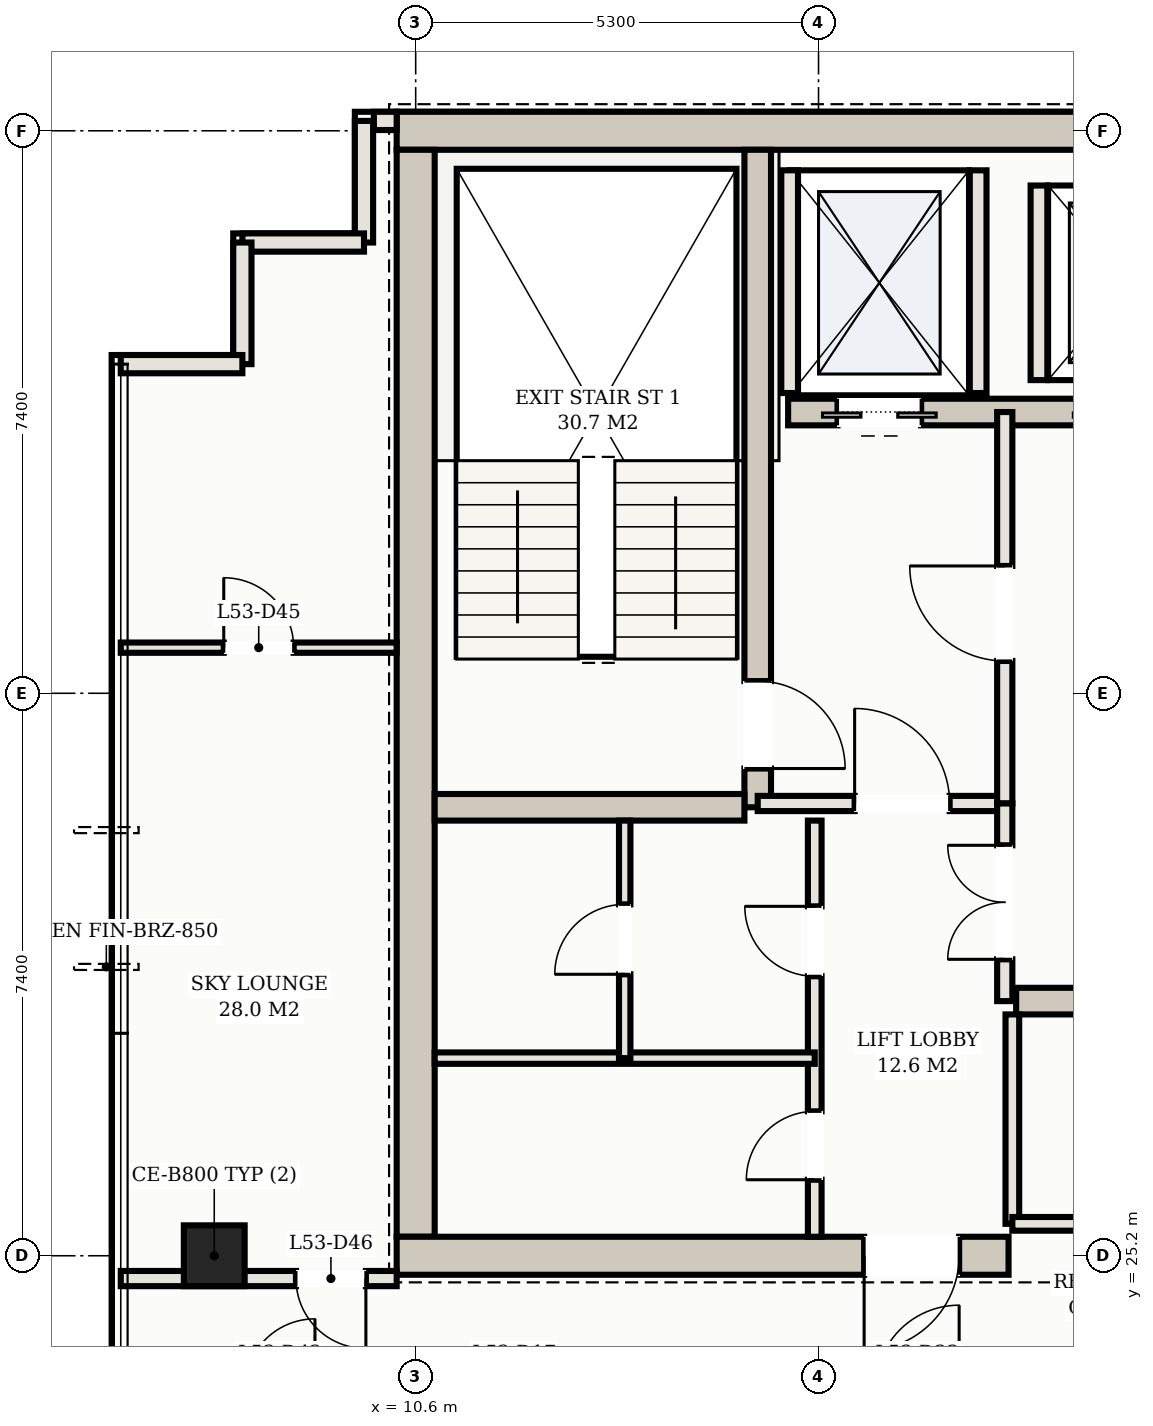
"""IFC4 building model, lengths in metres.
Left out: names, types, materials, properties, quantities, classifications, styles, units other than length and angle.
Written with IfcOpenShell. Run it as: python <this file> out.ifc"""

import sys

from ifc_helpers import new_model, si_unit, direction, frame, frame_2d, origin, origin_2d, place, context, subcontext, project, spatial, rectangle, hollow_rectangle, extrude, element, fill, save


model = new_model("IFC4")
c1 = context("Model", 3, precision=1e-05, world=origin(), true_north=direction((0.0, 1.0)))
c2 = subcontext(c1, "Body", "Model", "MODEL_VIEW")
j1 = project(units=[si_unit("LENGTHUNIT", "METRE"), si_unit("PLANEANGLEUNIT", "RADIAN")], contexts=[c1])
p1 = place(None, origin())
s1 = spatial("IfcSite", under=j1, at=p1, CompositionType="ELEMENT")
p2 = place(p1, origin())
s2 = spatial("IfcBuilding", under=s1, at=p2, CompositionType="ELEMENT")
p3 = place(p2, frame((0.0, 0.0, 196.7)))
s3 = spatial("IfcBuildingStorey", under=s2, at=p3, CompositionType="ELEMENT", Elevation=196.7)
p4 = place(p3, frame((10.35, 40.0, 0.0), z_axis=(0.0, 0.0, 1.0), x_axis=(1.0, 0.0, 0.0)))
e1 = element("IfcWall", 1, at=p4, inside=s3, PredefinedType="SHEAR", context=c2, shape_type="SweptSolid", body=[
    extrude(rectangle(XDim=32.3, YDim=0.5, at=frame_2d((16.15, 0.0))), origin(), (0.0, 0.0, 1.0), 3.11),
])
p5 = place(p3, frame((10.6, 25.45, 0.0), z_axis=(0.0, 0.0, 1.0), x_axis=(0.0, 1.0, 0.0)))
e2 = element("IfcWall", 2, at=p5, inside=s3, PredefinedType="SHEAR", context=c2, shape_type="SweptSolid", body=[
    extrude(rectangle(XDim=14.3, YDim=0.5, at=frame_2d((7.15, 0.0))), origin(), (0.0, 0.0, 1.0), 3.11),
])
p6 = place(p3, frame((10.35, 25.2, 0.0), z_axis=(0.0, 0.0, 1.0), x_axis=(1.0, 0.0, 0.0)))
e3 = element("IfcWall", 3, at=p6, inside=s3, PredefinedType="SHEAR", context=c2, shape_type="SweptSolid", body=[
    extrude(rectangle(XDim=8.05, YDim=0.5, at=frame_2d((4.025, 0.0))), origin(), (0.0, 0.0, 1.0), 3.11),
])
p7 = place(p6, frame((6.15, 0.0, 0.0)))
e4 = element("IfcOpeningElement", 4, at=p7, cuts=e3, PredefinedType="OPENING", context=c2, shape_type="SweptSolid", body=[
    extrude(rectangle(XDim=1.25, YDim=2.2, at=frame_2d((0.625, 1.1))), frame((0.0, 0.26, 0.0), z_axis=(0.0, -1.0, 0.0), x_axis=(1.0, 0.0, 0.0)), (0.0, 0.0, 1.0), 0.52),
])
p8 = place(p3, frame((15.1, 31.1, 0.0), z_axis=(0.0, 0.0, 1.0), x_axis=(0.0, 1.0, 0.0)))
e5 = element("IfcWall", 5, at=p8, inside=s3, PredefinedType="SHEAR", context=c2, shape_type="SweptSolid", body=[
    extrude(rectangle(XDim=8.65, YDim=0.35, at=frame_2d((4.325, 0.0))), origin(), (0.0, 0.0, 1.0), 3.11),
])
p9 = place(p8, frame((0.51, 0.0, 0.0)))
e6 = element("IfcOpeningElement", 6, at=p9, cuts=e5, PredefinedType="OPENING", context=c2, shape_type="SweptSolid", body=[
    extrude(rectangle(XDim=1.15, YDim=2.2, at=frame_2d((0.575, 1.1))), frame((0.0, 0.185, 0.0), z_axis=(0.0, -1.0, 0.0), x_axis=(1.0, 0.0, 0.0)), (0.0, 0.0, 1.0), 0.37),
])
p10 = place(p3, frame((10.85, 31.1, 0.0), z_axis=(0.0, 0.0, 1.0), x_axis=(1.0, 0.0, 0.0)))
e7 = element("IfcWall", 7, at=p10, inside=s3, PredefinedType="SHEAR", context=c2, shape_type="SweptSolid", body=[
    extrude(rectangle(XDim=4.075, YDim=0.35, at=frame_2d((2.038, 0.0))), origin(), (0.0, 0.0, 1.0), 3.11),
])
p11 = place(p3, frame((15.5, 36.3, 0.0), z_axis=(0.0, 0.0, 1.0), x_axis=(1.0, 0.0, 0.0)))
e8 = element("IfcWall", 8, at=p11, inside=s3, PredefinedType="SHEAR", context=c2, shape_type="SweptSolid", body=[
    extrude(rectangle(XDim=22.0, YDim=0.35, at=frame_2d((11.0, 0.0))), origin(), (0.0, 0.0, 1.0), 3.11),
])
p12 = place(p11, frame((0.65, 0.0, 0.0)))
e9 = element("IfcOpeningElement", 9, at=p12, cuts=e8, PredefinedType="OPENING", context=c2, shape_type="SweptSolid", body=[
    extrude(rectangle(XDim=1.1, YDim=2.15, at=frame_2d((0.55, 1.075))), frame((0.0, 0.185, 0.0), z_axis=(0.0, -1.0, 0.0), x_axis=(1.0, 0.0, 0.0)), (0.0, 0.0, 1.0), 0.37),
])
p13 = place(p11, frame((20.25, 0.0, 0.0)))
e10 = element("IfcOpeningElement", 10, at=p13, cuts=e8, PredefinedType="OPENING", context=c2, shape_type="SweptSolid", body=[
    extrude(rectangle(XDim=1.1, YDim=2.15, at=frame_2d((0.55, 1.075))), frame((0.0, 0.185, 0.0), z_axis=(0.0, -1.0, 0.0), x_axis=(1.0, 0.0, 0.0)), (0.0, 0.0, 1.0), 0.37),
])
p14 = place(p11, frame((17.05, 0.0, 0.0)))
e11 = element("IfcOpeningElement", 11, at=p14, cuts=e8, PredefinedType="OPENING", context=c2, shape_type="SweptSolid", body=[
    extrude(rectangle(XDim=1.3, YDim=2.2, at=frame_2d((0.65, 1.1))), frame((0.0, 0.185, 0.0), z_axis=(0.0, -1.0, 0.0), x_axis=(1.0, 0.0, 0.0)), (0.0, 0.0, 1.0), 0.37),
])
p15 = place(p11, frame((3.95, 0.0, 0.0)))
e12 = element("IfcOpeningElement", 12, at=p15, cuts=e8, PredefinedType="OPENING", context=c2, shape_type="SweptSolid", body=[
    extrude(rectangle(XDim=1.1, YDim=2.15, at=frame_2d((0.55, 1.075))), frame((0.0, 0.185, 0.0), z_axis=(0.0, -1.0, 0.0), x_axis=(1.0, 0.0, 0.0)), (0.0, 0.0, 1.0), 0.37),
])
p16 = place(p11, frame((6.55, 0.0, 0.0)))
e13 = element("IfcOpeningElement", 13, at=p16, cuts=e8, PredefinedType="OPENING", context=c2, shape_type="SweptSolid", body=[
    extrude(rectangle(XDim=1.1, YDim=2.15, at=frame_2d((0.55, 1.075))), frame((0.0, 0.185, 0.0), z_axis=(0.0, -1.0, 0.0), x_axis=(1.0, 0.0, 0.0)), (0.0, 0.0, 1.0), 0.37),
])
p17 = place(p11, frame((9.15, 0.0, 0.0)))
e14 = element("IfcOpeningElement", 14, at=p17, cuts=e8, PredefinedType="OPENING", context=c2, shape_type="SweptSolid", body=[
    extrude(rectangle(XDim=1.1, YDim=2.15, at=frame_2d((0.55, 1.075))), frame((0.0, 0.185, 0.0), z_axis=(0.0, -1.0, 0.0), x_axis=(1.0, 0.0, 0.0)), (0.0, 0.0, 1.0), 0.37),
])
p18 = place(p3, frame((18.5, 28.55, 0.0), z_axis=(0.0, 0.0, 1.0), x_axis=(1.0, 0.0, 0.0)))
e15 = element("IfcWall", 15, at=p18, inside=s3, PredefinedType="SHEAR", context=c2, shape_type="SweptSolid", body=[
    extrude(rectangle(XDim=16.0, YDim=0.35, at=frame_2d((8.0, 0.0))), origin(), (0.0, 0.0, 1.0), 3.11),
])
p19 = place(p3, frame((7.95, 25.2, 0.0), z_axis=(0.0, 0.0, 1.0), x_axis=(1.0, 0.0, 0.0)))
e16 = element("IfcColumn", 16, at=p19, inside=s3, PredefinedType="COLUMN", context=c2, shape_type="SweptSolid", body=[
    extrude(hollow_rectangle(XDim=0.8, YDim=0.8, WallThickness=0.028, at=origin_2d()), origin(), (0.0, 0.0, 1.0), 3.3),
])
for number, where, z_axis, x_axis in (
    (17, (15.52, 36.55, 0.0), (0.0, 0.0, 1.0), (0.0, 1.0, 0.0)),
    (18, (18.0, 36.55, 0.0), (0.0, 0.0, 1.0), (0.0, 1.0, 0.0)),
):
    element("IfcWall", number, at=place(p3, frame(where, z_axis=z_axis, x_axis=x_axis)), inside=s3, PredefinedType="SOLIDWALL", context=c2, shape_type="SweptSolid", body=[
        extrude(rectangle(XDim=2.93, YDim=0.22, at=frame_2d((1.465, 0.0))), origin(), (0.0, 0.0, 1.0), 3.11),
    ])
p20 = place(p3, frame((18.8, 36.72, 0.0), z_axis=(0.0, 0.0, 1.0), x_axis=(0.0, 1.0, 0.0)))
e19 = element("IfcWall", 19, at=p20, inside=s3, PredefinedType="SOLIDWALL", context=c2, shape_type="SweptSolid", body=[
    extrude(rectangle(XDim=2.56, YDim=0.22, at=frame_2d((1.28, 0.0))), origin(), (0.0, 0.0, 1.0), 3.11),
])
p21 = place(p3, frame((10.35, 40.13, 0.0), z_axis=(0.0, 0.0, 1.0), x_axis=(-1.0, 0.0, 0.0)))
e20 = element("IfcWall", 20, at=p21, inside=s3, PredefinedType="SOLIDWALL", context=c2, shape_type="SweptSolid", body=[
    extrude(rectangle(XDim=0.3, YDim=0.24, at=frame_2d((0.15, 0.0))), origin(), (0.0, 0.0, 1.0), 3.11),
])
for number, where, z_axis, x_axis in (
    (21, (9.92, 40.13, 0.0), (0.0, 0.0, 1.0), (0.0, -1.0, 0.0)),
    (22, (9.92, 38.53, 0.0), (0.0, 0.0, 1.0), (-1.0, 0.0, 0.0)),
):
    element("IfcWall", number, at=place(p3, frame(where, z_axis=z_axis, x_axis=x_axis)), inside=s3, PredefinedType="SOLIDWALL", context=c2, shape_type="SweptSolid", body=[
        extrude(rectangle(XDim=1.6, YDim=0.24, at=frame_2d((0.8, 0.0))), origin(), (0.0, 0.0, 1.0), 3.11),
    ])
for number, where, z_axis, x_axis in (
    (23, (8.32, 38.53, 0.0), (0.0, 0.0, 1.0), (0.0, -1.0, 0.0)),
    (24, (8.32, 36.93, 0.0), (0.0, 0.0, 1.0), (-1.0, 0.0, 0.0)),
):
    element("IfcWall", number, at=place(p3, frame(where, z_axis=z_axis, x_axis=x_axis)), inside=s3, PredefinedType="SOLIDWALL", context=c2, shape_type="SweptSolid", body=[
        extrude(rectangle(XDim=1.6, YDim=0.24, at=frame_2d((0.8, 0.0))), origin(), (0.0, 0.0, 1.0), 3.11),
    ])
p22 = place(p3, frame((15.1, 31.15, 0.0), z_axis=(0.0, 0.0, 1.0), x_axis=(1.0, 0.0, 0.0)))
e25 = element("IfcWall", 25, at=p22, inside=s3, PredefinedType="PARTITIONING", context=c2, shape_type="SweptSolid", body=[
    extrude(rectangle(XDim=3.25, YDim=0.2, at=frame_2d((1.625, 0.0))), origin(), (0.0, 0.0, 1.0), 2.43),
])
p23 = place(p22, frame((1.275, 0.0, 0.0)))
e26 = element("IfcOpeningElement", 26, at=p23, cuts=e25, PredefinedType="OPENING", context=c2, shape_type="SweptSolid", body=[
    extrude(rectangle(XDim=1.25, YDim=2.2, at=frame_2d((0.625, 1.1))), frame((0.0, 0.11, 0.0), z_axis=(0.0, -1.0, 0.0), x_axis=(1.0, 0.0, 0.0)), (0.0, 0.0, 1.0), 0.22),
])
p24 = place(p3, frame((18.35, 31.15, 0.0), z_axis=(0.0, 0.0, 1.0), x_axis=(0.0, 1.0, 0.0)))
e27 = element("IfcWall", 27, at=p24, inside=s3, PredefinedType="PARTITIONING", context=c2, shape_type="SweptSolid", body=[
    extrude(rectangle(XDim=5.15, YDim=0.2, at=frame_2d((2.575, 0.0))), origin(), (0.0, 0.0, 1.0), 2.43),
])
p25 = place(p24, frame((1.875, 0.0, 0.0)))
e28 = element("IfcOpeningElement", 28, at=p25, cuts=e27, PredefinedType="OPENING", context=c2, shape_type="SweptSolid", body=[
    extrude(rectangle(XDim=1.25, YDim=2.2, at=frame_2d((0.625, 1.1))), frame((0.0, 0.11, 0.0), z_axis=(0.0, -1.0, 0.0), x_axis=(1.0, 0.0, 0.0)), (0.0, 0.0, 1.0), 0.22),
])
p26 = place(p3, frame((15.85, 25.45, 0.0), z_axis=(0.0, 0.0, 1.0), x_axis=(0.0, 1.0, 0.0)))
e29 = element("IfcWall", 29, at=p26, inside=s3, PredefinedType="PARTITIONING", context=c2, shape_type="SweptSolid", body=[
    extrude(rectangle(XDim=5.475, YDim=0.18, at=frame_2d((2.738, 0.0))), origin(), (0.0, 0.0, 1.0), 2.43),
])
p27 = place(p26, frame((0.75, 0.0, 0.0)))
e30 = element("IfcOpeningElement", 30, at=p27, cuts=e29, PredefinedType="OPENING", context=c2, shape_type="SweptSolid", body=[
    extrude(rectangle(XDim=0.9, YDim=2.15, at=frame_2d((0.45, 1.075))), frame((0.0, 0.1, 0.0), z_axis=(0.0, -1.0, 0.0), x_axis=(1.0, 0.0, 0.0)), (0.0, 0.0, 1.0), 0.2),
])
p28 = place(p26, frame((3.427, 0.0, 0.0)))
e31 = element("IfcOpeningElement", 31, at=p28, cuts=e29, PredefinedType="OPENING", context=c2, shape_type="SweptSolid", body=[
    extrude(rectangle(XDim=0.92, YDim=2.15, at=frame_2d((0.46, 1.075))), frame((0.0, 0.1, 0.0), z_axis=(0.0, -1.0, 0.0), x_axis=(1.0, 0.0, 0.0)), (0.0, 0.0, 1.0), 0.2),
])
p29 = place(p3, frame((10.85, 27.8, 0.0), z_axis=(0.0, 0.0, 1.0), x_axis=(1.0, 0.0, 0.0)))
e32 = element("IfcWall", 32, at=p29, inside=s3, PredefinedType="PARTITIONING", context=c2, shape_type="SweptSolid", body=[
    extrude(rectangle(XDim=5.0, YDim=0.15, at=frame_2d((2.5, 0.0))), origin(), (0.0, 0.0, 1.0), 2.43),
])
p30 = place(p3, frame((13.35, 27.8, 0.0), z_axis=(0.0, 0.0, 1.0), x_axis=(0.0, 1.0, 0.0)))
e33 = element("IfcWall", 33, at=p30, inside=s3, PredefinedType="PARTITIONING", context=c2, shape_type="SweptSolid", body=[
    extrude(rectangle(XDim=3.125, YDim=0.15, at=frame_2d((1.562, 0.0))), origin(), (0.0, 0.0, 1.0), 2.43),
])
p31 = place(p30, frame((1.103, 0.0, 0.0)))
e34 = element("IfcOpeningElement", 34, at=p31, cuts=e33, PredefinedType="OPENING", context=c2, shape_type="SweptSolid", body=[
    extrude(rectangle(XDim=0.92, YDim=2.15, at=frame_2d((0.46, 1.075))), frame((0.0, 0.085, 0.0), z_axis=(0.0, -1.0, 0.0), x_axis=(1.0, 0.0, 0.0)), (0.0, 0.0, 1.0), 0.17),
])
p32 = place(p3, frame((18.35, 28.55, 0.0), z_axis=(0.0, 0.0, 1.0), x_axis=(0.0, 1.0, 0.0)))
e35 = element("IfcWall", 35, at=p32, inside=s3, PredefinedType="PARTITIONING", context=c2, shape_type="SweptSolid", body=[
    extrude(rectangle(XDim=2.6, YDim=0.2, at=frame_2d((1.3, 0.0))), origin(), (0.0, 0.0, 1.0), 2.43),
])
p33 = place(p32, frame((0.55, 0.0, 0.0)))
e36 = element("IfcOpeningElement", 36, at=p33, cuts=e35, PredefinedType="OPENING", context=c2, shape_type="SweptSolid", body=[
    extrude(rectangle(XDim=1.5, YDim=2.25, at=frame_2d((0.75, 1.125))), frame((0.0, 0.11, 0.0), z_axis=(0.0, -1.0, 0.0), x_axis=(1.0, 0.0, 0.0)), (0.0, 0.0, 1.0), 0.22),
])
p34 = place(p3, frame((18.45, 25.62, 0.0), z_axis=(0.0, 0.0, 1.0), x_axis=(0.0, 1.0, 0.0)))
e37 = element("IfcWall", 37, at=p34, inside=s3, PredefinedType="PARTITIONING", context=c2, shape_type="SweptSolid", body=[
    extrude(rectangle(XDim=2.755, YDim=0.18, at=frame_2d((1.377, 0.0))), origin(), (0.0, 0.0, 1.0), 2.43),
])
p35 = place(p3, frame((18.45, 25.62, 0.0), z_axis=(0.0, 0.0, 1.0), x_axis=(1.0, 0.0, 0.0)))
e38 = element("IfcWall", 38, at=p35, inside=s3, PredefinedType="PARTITIONING", context=c2, shape_type="SweptSolid", body=[
    extrude(rectangle(XDim=7.9, YDim=0.18, at=frame_2d((3.95, 0.0))), origin(), (0.0, 0.0, 1.0), 2.43),
])
p36 = place(p35, frame((3.34, 0.0, 0.0)))
e39 = element("IfcOpeningElement", 39, at=p36, cuts=e38, PredefinedType="OPENING", context=c2, shape_type="SweptSolid", body=[
    extrude(rectangle(XDim=0.92, YDim=2.15, at=frame_2d((0.46, 1.075))), frame((0.0, 0.1, 0.0), z_axis=(0.0, -1.0, 0.0), x_axis=(1.0, 0.0, 0.0)), (0.0, 0.0, 1.0), 0.2),
])
p37 = place(p3, frame((6.72, 24.9, 0.0), z_axis=(0.0, 0.0, 1.0), x_axis=(1.0, 0.0, 0.0)))
e40 = element("IfcWall", 40, at=p37, inside=s3, PredefinedType="PARTITIONING", context=c2, shape_type="SweptSolid", body=[
    extrude(rectangle(XDim=3.63, YDim=0.2, at=frame_2d((1.815, 0.0))), origin(), (0.0, 0.0, 1.0), 2.43),
])
p38 = place(p37, frame((2.305, 0.0, 0.0)))
e41 = element("IfcOpeningElement", 41, at=p38, cuts=e40, PredefinedType="OPENING", context=c2, shape_type="SweptSolid", body=[
    extrude(rectangle(XDim=0.92, YDim=2.15, at=frame_2d((0.46, 1.075))), frame((0.0, 0.11, 0.0), z_axis=(0.0, -1.0, 0.0), x_axis=(1.0, 0.0, 0.0)), (0.0, 0.0, 1.0), 0.22),
])
p39 = place(p3, frame((6.72, 33.2, 0.0), z_axis=(0.0, 0.0, 1.0), x_axis=(1.0, 0.0, 0.0)))
e42 = element("IfcWall", 42, at=p39, inside=s3, PredefinedType="PARTITIONING", context=c2, shape_type="SweptSolid", body=[
    extrude(rectangle(XDim=3.63, YDim=0.135, at=frame_2d((1.815, 0.0))), origin(), (0.0, 0.0, 1.0), 2.43),
])
p40 = place(p39, frame((1.355, 0.0, 0.0)))
e43 = element("IfcOpeningElement", 43, at=p40, cuts=e42, PredefinedType="OPENING", context=c2, shape_type="SweptSolid", body=[
    extrude(rectangle(XDim=0.92, YDim=2.15, at=frame_2d((0.46, 1.075))), frame((0.0, 0.078, 0.0), z_axis=(0.0, -1.0, 0.0), x_axis=(1.0, 0.0, 0.0)), (0.0, 0.0, 1.0), 0.155),
])
p41 = place(p12, frame((1.1, 0.0, 0.0), z_axis=(0.0, 0.0, 1.0), x_axis=(-1.0, 0.0, 0.0)))
e44 = element("IfcDoor", 44, at=p41, inside=s3, OperationType="DOUBLE_DOOR_SLIDING", PredefinedType="DOOR", context=c2, shape_type="SweptSolid", body=[
    extrude(rectangle(XDim=1.1, YDim=2.15, at=frame_2d((0.55, 1.075))), frame((0.0, 0.025, 0.0), z_axis=(0.0, -1.0, 0.0), x_axis=(1.0, 0.0, 0.0)), (0.0, 0.0, 1.0), 0.05),
])
fill(e9, e44)
p42 = place(p7, frame((1.25, 0.0, 0.0), z_axis=(0.0, 0.0, 1.0), x_axis=(-1.0, 0.0, 0.0)))
e45 = element("IfcDoor", 45, at=p42, inside=s3, OperationType="SINGLE_SWING_RIGHT", PredefinedType="DOOR", context=c2, shape_type="SweptSolid", body=[
    extrude(rectangle(XDim=1.25, YDim=2.2, at=frame_2d((0.625, 1.1))), frame((0.0, 0.025, 0.0), z_axis=(0.0, -1.0, 0.0), x_axis=(1.0, 0.0, 0.0)), (0.0, 0.0, 1.0), 0.05),
])
fill(e4, e45)
p43 = place(p23, origin())
e46 = element("IfcDoor", 46, at=p43, inside=s3, OperationType="SINGLE_SWING_LEFT", PredefinedType="DOOR", context=c2, shape_type="SweptSolid", body=[
    extrude(rectangle(XDim=1.25, YDim=2.2, at=frame_2d((0.625, 1.1))), frame((0.0, 0.025, 0.0), z_axis=(0.0, -1.0, 0.0), x_axis=(1.0, 0.0, 0.0)), (0.0, 0.0, 1.0), 0.05),
])
fill(e26, e46)
p44 = place(p25, origin())
e47 = element("IfcDoor", 47, at=p44, inside=s3, OperationType="SINGLE_SWING_RIGHT", PredefinedType="DOOR", context=c2, shape_type="SweptSolid", body=[
    extrude(rectangle(XDim=1.25, YDim=2.2, at=frame_2d((0.625, 1.1))), frame((0.0, 0.025, 0.0), z_axis=(0.0, -1.0, 0.0), x_axis=(1.0, 0.0, 0.0)), (0.0, 0.0, 1.0), 0.05),
])
fill(e28, e47)
p45 = place(p9, frame((1.15, 0.0, 0.0), z_axis=(0.0, 0.0, 1.0), x_axis=(-1.0, 0.0, 0.0)))
e48 = element("IfcDoor", 48, at=p45, inside=s3, OperationType="SINGLE_SWING_RIGHT", PredefinedType="DOOR", context=c2, shape_type="SweptSolid", body=[
    extrude(rectangle(XDim=1.15, YDim=2.2, at=frame_2d((0.575, 1.1))), frame((0.0, 0.025, 0.0), z_axis=(0.0, -1.0, 0.0), x_axis=(1.0, 0.0, 0.0)), (0.0, 0.0, 1.0), 0.05),
])
fill(e6, e48)
p46 = place(p27, origin())
e49 = element("IfcDoor", 49, at=p46, inside=s3, OperationType="SINGLE_SWING_LEFT", PredefinedType="DOOR", context=c2, shape_type="SweptSolid", body=[
    extrude(rectangle(XDim=0.9, YDim=2.15, at=frame_2d((0.45, 1.075))), frame((0.0, 0.025, 0.0), z_axis=(0.0, -1.0, 0.0), x_axis=(1.0, 0.0, 0.0)), (0.0, 0.0, 1.0), 0.05),
])
fill(e30, e49)
p47 = place(p28, origin())
e50 = element("IfcDoor", 50, at=p47, inside=s3, OperationType="SINGLE_SWING_RIGHT", PredefinedType="DOOR", context=c2, shape_type="SweptSolid", body=[
    extrude(rectangle(XDim=0.92, YDim=2.15, at=frame_2d((0.46, 1.075))), frame((0.0, 0.025, 0.0), z_axis=(0.0, -1.0, 0.0), x_axis=(1.0, 0.0, 0.0)), (0.0, 0.0, 1.0), 0.05),
])
fill(e31, e50)
p48 = place(p31, origin())
e51 = element("IfcDoor", 51, at=p48, inside=s3, OperationType="SINGLE_SWING_LEFT", PredefinedType="DOOR", context=c2, shape_type="SweptSolid", body=[
    extrude(rectangle(XDim=0.92, YDim=2.15, at=frame_2d((0.46, 1.075))), frame((0.0, 0.025, 0.0), z_axis=(0.0, -1.0, 0.0), x_axis=(1.0, 0.0, 0.0)), (0.0, 0.0, 1.0), 0.05),
])
fill(e34, e51)
p49 = place(p33, origin())
e52 = element("IfcDoor", 52, at=p49, inside=s3, OperationType="DOUBLE_DOOR_SINGLE_SWING", PredefinedType="DOOR", context=c2, shape_type="SweptSolid", body=[
    extrude(rectangle(XDim=1.5, YDim=2.25, at=frame_2d((0.75, 1.125))), frame((0.0, 0.025, 0.0), z_axis=(0.0, -1.0, 0.0), x_axis=(1.0, 0.0, 0.0)), (0.0, 0.0, 1.0), 0.05),
])
fill(e36, e52)
p50 = place(p40, origin())
e53 = element("IfcDoor", 53, at=p50, inside=s3, OperationType="SINGLE_SWING_LEFT", PredefinedType="DOOR", context=c2, shape_type="SweptSolid", body=[
    extrude(rectangle(XDim=0.92, YDim=2.15, at=frame_2d((0.46, 1.075))), frame((0.0, 0.025, 0.0), z_axis=(0.0, -1.0, 0.0), x_axis=(1.0, 0.0, 0.0)), (0.0, 0.0, 1.0), 0.05),
])
fill(e43, e53)
p51 = place(p38, frame((0.92, 0.0, 0.0), z_axis=(0.0, 0.0, 1.0), x_axis=(-1.0, 0.0, 0.0)))
e54 = element("IfcDoor", 54, at=p51, inside=s3, OperationType="SINGLE_SWING_LEFT", PredefinedType="DOOR", context=c2, shape_type="SweptSolid", body=[
    extrude(rectangle(XDim=0.92, YDim=2.15, at=frame_2d((0.46, 1.075))), frame((0.0, 0.025, 0.0), z_axis=(0.0, -1.0, 0.0), x_axis=(1.0, 0.0, 0.0)), (0.0, 0.0, 1.0), 0.05),
])
fill(e41, e54)
save(model, sys.argv[1])
